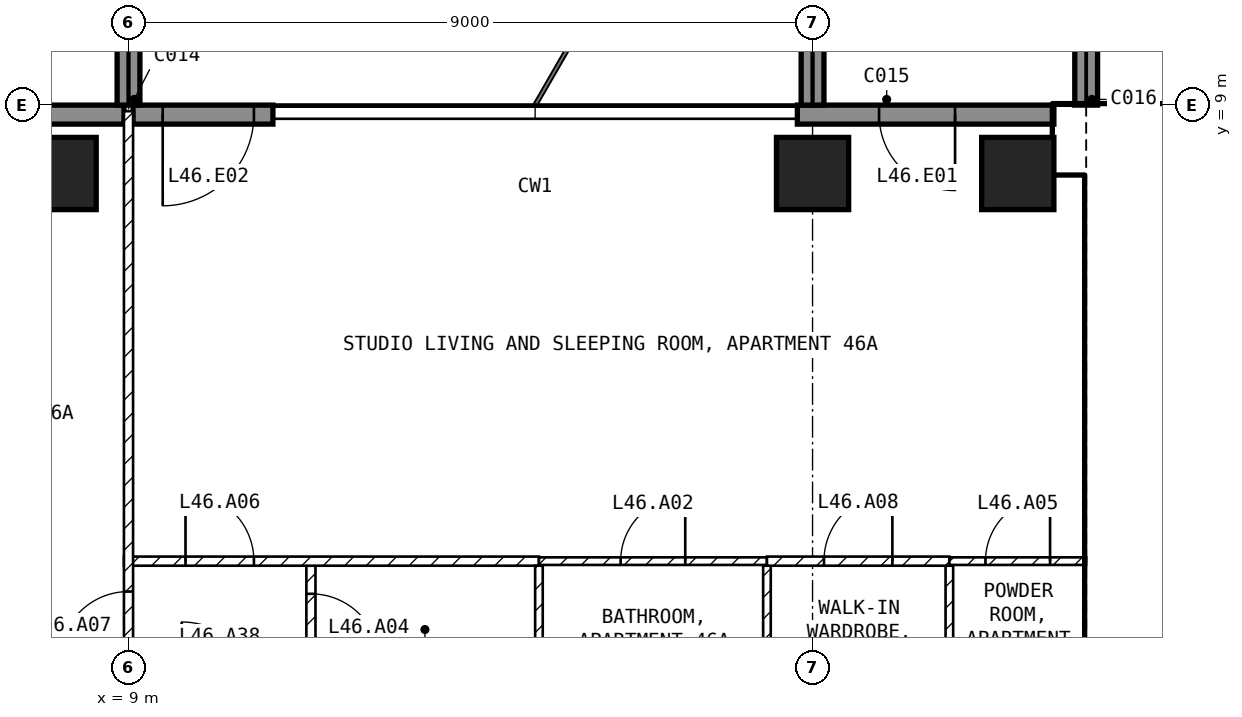
"""IFC4 building model, lengths in metres.
Left out: names, types, materials, properties, quantities, classifications, styles, units other than length and angle.
Written with IfcOpenShell. Run it as: python <this file> out.ifc"""

import sys

from ifc_helpers import new_model, si_unit, direction, frame, frame_2d, origin, origin_2d, place, context, subcontext, project, spatial, rectangle, extrude, element, fill, save


model = new_model("IFC4")
c1 = context("Model", 3, precision=1e-05, world=origin(), true_north=direction((0.0, 1.0)))
c2 = subcontext(c1, "Body", "Model", "MODEL_VIEW")
j1 = project(units=[si_unit("LENGTHUNIT", "METRE"), si_unit("PLANEANGLEUNIT", "RADIAN")], contexts=[c1])
p1 = place(None, origin())
s1 = spatial("IfcSite", under=j1, at=p1, CompositionType="ELEMENT")
p2 = place(p1, origin())
s2 = spatial("IfcBuilding", under=s1, at=p2, CompositionType="ELEMENT")
p3 = place(p2, frame((0.0, 0.0, 187.6)))
s3 = spatial("IfcBuildingStorey", under=s2, at=p3, CompositionType="ELEMENT", Elevation=187.6)
for number, where, z_axis, x_axis in (
    (1, (8.1, 8.1, -0.25), (0.0, 0.0, 1.0), (1.0, 0.0, 0.0)),
    (2, (18.0, 8.1, -0.25), (0.0, 0.0, 1.0), (1.0, 0.0, 0.0)),
    (3, (20.7, 8.1, -0.25), (0.0, 0.0, 1.0), (1.0, 0.0, 0.0)),
):
    element("IfcColumn", number, at=place(p3, frame(where, z_axis=z_axis, x_axis=x_axis)), inside=s3, PredefinedType="COLUMN", context=c2, shape_type="SweptSolid", body=[
        extrude(rectangle(XDim=0.95, YDim=0.95, at=origin_2d()), origin(), (0.0, 0.0, 1.0), 3.5),
    ])
p4 = place(p3, frame((21.175, 8.875, 0.0), z_axis=(0.0, 0.0, 1.0), x_axis=(-1.0, 0.0, 0.0)))
e4 = element("IfcWall", 4, at=p4, inside=s3, PredefinedType="SOLIDWALL", context=c2, shape_type="SweptSolid", body=[
    extrude(rectangle(XDim=3.375, YDim=0.25, at=frame_2d((1.688, 0.0))), origin(), (0.0, 0.0, 1.0), 3.25),
])
p5 = place(p4, frame((1.3, 0.0, 0.0)))
e5 = element("IfcOpeningElement", 5, at=p5, cuts=e4, PredefinedType="OPENING", context=c2, shape_type="SweptSolid", body=[
    extrude(rectangle(XDim=1.0, YDim=2.4, at=frame_2d((0.5, 1.2))), frame((0.0, 0.135, 0.0), z_axis=(0.0, -1.0, 0.0), x_axis=(1.0, 0.0, 0.0)), (0.0, 0.0, 1.0), 0.27),
])
p6 = place(p3, frame((10.9, 8.875, 0.0), z_axis=(0.0, 0.0, 1.0), x_axis=(-1.0, 0.0, 0.0)))
e6 = element("IfcWall", 6, at=p6, inside=s3, PredefinedType="SOLIDWALL", context=c2, shape_type="SweptSolid", body=[
    extrude(rectangle(XDim=1.84, YDim=0.25, at=frame_2d((0.92, 0.0))), origin(), (0.0, 0.0, 1.0), 3.25),
])
p7 = place(p6, frame((0.25, 0.0, 0.0)))
e7 = element("IfcOpeningElement", 7, at=p7, cuts=e6, PredefinedType="OPENING", context=c2, shape_type="SweptSolid", body=[
    extrude(rectangle(XDim=1.2, YDim=2.4, at=frame_2d((0.6, 1.2))), frame((0.0, 0.135, 0.0), z_axis=(0.0, -1.0, 0.0), x_axis=(1.0, 0.0, 0.0)), (0.0, 0.0, 1.0), 0.27),
])
p8 = place(p3, frame((8.94, 8.875, 0.0), z_axis=(0.0, 0.0, 1.0), x_axis=(-1.0, 0.0, 0.0)))
e8 = element("IfcWall", 8, at=p8, inside=s3, PredefinedType="SOLIDWALL", context=c2, shape_type="SweptSolid", body=[
    extrude(rectangle(XDim=3.115, YDim=0.25, at=frame_2d((1.558, 0.0))), origin(), (0.0, 0.0, 1.0), 3.25),
])
p9 = place(p8, frame((1.665, 0.0, 0.0)))
e9 = element("IfcOpeningElement", 9, at=p9, cuts=e8, PredefinedType="OPENING", context=c2, shape_type="SweptSolid", body=[
    extrude(rectangle(XDim=1.2, YDim=2.4, at=frame_2d((0.6, 1.2))), frame((0.0, 0.135, 0.0), z_axis=(0.0, -1.0, 0.0), x_axis=(1.0, 0.0, 0.0)), (0.0, 0.0, 1.0), 0.27),
])
for number, where, z_axis, x_axis in (
    (10, (9.0, 9.0, 0.0), (0.0, 0.0, 1.0), (0.0, 1.0, 0.0)),
    (11, (18.0, 9.0, 0.0), (0.0, 0.0, 1.0), (0.0, 1.0, 0.0)),
    (12, (21.6, 9.0, 0.0), (0.0, 0.0, 1.0), (0.0, 1.0, 0.0)),
):
    element("IfcWall", number, at=place(p3, frame(where, z_axis=z_axis, x_axis=x_axis)), inside=s3, PredefinedType="SOLIDWALL", context=c2, shape_type="SweptSolid", body=[
        extrude(rectangle(XDim=2.7, YDim=0.3, at=frame_2d((1.35, 0.0))), origin(), (0.0, 0.0, 1.0), 3.25),
    ])
p10 = place(p3, frame((21.175, 8.55, 0.0), z_axis=(0.0, 0.0, 1.0), x_axis=(1.0, 0.0, 0.0)))
e13 = element("IfcWall", 13, at=p10, inside=s3, PredefinedType="SHEAR", context=c2, shape_type="SweptSolid", body=[
    extrude(rectangle(XDim=8.425, YDim=0.9, at=frame_2d((4.212, 0.0))), origin(), (0.0, 0.0, 1.0), 3.25),
])
p11 = place(p3, frame((21.825, 1.2, 0.0), z_axis=(0.0, 0.0, 1.0), x_axis=(0.0, 1.0, 0.0)))
e14 = element("IfcWall", 14, at=p11, inside=s3, PredefinedType="SHEAR", context=c2, shape_type="SweptSolid", body=[
    extrude(rectangle(XDim=6.9, YDim=0.45, at=frame_2d((3.45, 0.0))), origin(), (0.0, 0.0, 1.0), 3.25),
])
p12 = place(p3, frame((22.05, 5.15, 0.0), z_axis=(0.0, 0.0, 1.0), x_axis=(1.0, 0.0, 0.0)))
e15 = element("IfcWall", 15, at=p12, inside=s3, PredefinedType="SOLIDWALL", context=c2, shape_type="SweptSolid", body=[
    extrude(rectangle(XDim=6.3, YDim=0.2, at=frame_2d((3.15, 0.0))), origin(), (0.0, 0.0, 1.0), 3.25),
])
p13 = place(p12, frame((0.2, 0.0, 0.0)))
e16 = element("IfcOpeningElement", 16, at=p13, cuts=e15, PredefinedType="OPENING", context=c2, shape_type="SweptSolid", body=[
    extrude(rectangle(XDim=1.0, YDim=2.1, at=frame_2d((0.5, 1.05))), frame((0.0, 0.11, 0.0), z_axis=(0.0, -1.0, 0.0), x_axis=(1.0, 0.0, 0.0)), (0.0, 0.0, 1.0), 0.22),
])
p14 = place(p3, frame((11.4, 2.94, 0.0), z_axis=(0.0, 0.0, 1.0), x_axis=(0.0, -1.0, 0.0)))
e17 = element("IfcWall", 17, at=p14, inside=s3, PredefinedType="PARTITIONING", context=c2, shape_type="SweptSolid", body=[
    extrude(rectangle(XDim=1.64, YDim=0.12, at=frame_2d((0.82, 0.0))), origin(), (0.0, 0.0, 1.0), 3.25),
])
p15 = place(p14, frame((0.37, 0.0, 0.0)))
e18 = element("IfcOpeningElement", 18, at=p15, cuts=e17, PredefinedType="OPENING", context=c2, shape_type="SweptSolid", body=[
    extrude(rectangle(XDim=0.9, YDim=2.1, at=frame_2d((0.45, 1.05))), frame((0.0, 0.07, 0.0), z_axis=(0.0, -1.0, 0.0), x_axis=(1.0, 0.0, 0.0)), (0.0, 0.0, 1.0), 0.14),
])
p16 = place(p3, frame((8.94, 3.0, 0.0), z_axis=(0.0, 0.0, 1.0), x_axis=(1.0, 0.0, 0.0)))
e19 = element("IfcWall", 19, at=p16, inside=s3, PredefinedType="PARTITIONING", context=c2, shape_type="SweptSolid", body=[
    extrude(rectangle(XDim=5.46, YDim=0.12, at=frame_2d((2.73, 0.0))), origin(), (0.0, 0.0, 1.0), 3.25),
])
p17 = place(p16, frame((0.81, 0.0, 0.0)))
e20 = element("IfcOpeningElement", 20, at=p17, cuts=e19, PredefinedType="OPENING", context=c2, shape_type="SweptSolid", body=[
    extrude(rectangle(XDim=0.9, YDim=2.1, at=frame_2d((0.45, 1.05))), frame((0.0, 0.07, 0.0), z_axis=(0.0, -1.0, 0.0), x_axis=(1.0, 0.0, 0.0)), (0.0, 0.0, 1.0), 0.14),
])
p18 = place(p3, frame((9.0, 1.3, 0.0), z_axis=(0.0, 0.0, 1.0), x_axis=(0.0, 1.0, 0.0)))
e21 = element("IfcWall", 21, at=p18, inside=s3, PredefinedType="PARTITIONING", context=c2, shape_type="SweptSolid", body=[
    extrude(rectangle(XDim=7.62, YDim=0.12, at=frame_2d((3.81, 0.0))), origin(), (0.0, 0.0, 1.0), 3.25),
])
p19 = place(p18, frame((0.4, 0.0, 0.0)))
e22 = element("IfcOpeningElement", 22, at=p19, cuts=e21, PredefinedType="OPENING", context=c2, shape_type="SweptSolid", body=[
    extrude(rectangle(XDim=0.9, YDim=2.1, at=frame_2d((0.45, 1.05))), frame((0.0, 0.07, 0.0), z_axis=(0.0, -1.0, 0.0), x_axis=(1.0, 0.0, 0.0)), (0.0, 0.0, 1.0), 0.14),
])
for number, where, z_axis, x_axis in (
    (23, (14.4, 2.94, 0.0), (0.0, 0.0, 1.0), (0.0, -1.0, 0.0)),
    (24, (17.4, 2.94, 0.0), (0.0, 0.0, 1.0), (0.0, -1.0, 0.0)),
):
    element("IfcWall", number, at=place(p3, frame(where, z_axis=z_axis, x_axis=x_axis)), inside=s3, PredefinedType="PARTITIONING", context=c2, shape_type="SweptSolid", body=[
        extrude(rectangle(XDim=1.64, YDim=0.1, at=frame_2d((0.82, 0.0))), origin(), (0.0, 0.0, 1.0), 3.25),
    ])
p20 = place(p3, frame((14.4, 3.0, 0.0), z_axis=(0.0, 0.0, 1.0), x_axis=(1.0, 0.0, 0.0)))
e25 = element("IfcWall", 25, at=p20, inside=s3, PredefinedType="PARTITIONING", context=c2, shape_type="SweptSolid", body=[
    extrude(rectangle(XDim=3.0, YDim=0.1, at=frame_2d((1.5, 0.0))), origin(), (0.0, 0.0, 1.0), 3.25),
])
p21 = place(p20, frame((1.075, 0.0, 0.0)))
e26 = element("IfcOpeningElement", 26, at=p21, cuts=e25, PredefinedType="OPENING", context=c2, shape_type="SweptSolid", body=[
    extrude(rectangle(XDim=0.85, YDim=2.1, at=frame_2d((0.425, 1.05))), frame((0.0, 0.06, 0.0), z_axis=(0.0, -1.0, 0.0), x_axis=(1.0, 0.0, 0.0)), (0.0, 0.0, 1.0), 0.12),
])
p22 = place(p3, frame((19.8, 2.94, 0.0), z_axis=(0.0, 0.0, 1.0), x_axis=(0.0, -1.0, 0.0)))
e27 = element("IfcWall", 27, at=p22, inside=s3, PredefinedType="PARTITIONING", context=c2, shape_type="SweptSolid", body=[
    extrude(rectangle(XDim=1.64, YDim=0.1, at=frame_2d((0.82, 0.0))), origin(), (0.0, 0.0, 1.0), 3.25),
])
p23 = place(p3, frame((17.4, 3.0, 0.0), z_axis=(0.0, 0.0, 1.0), x_axis=(1.0, 0.0, 0.0)))
e28 = element("IfcWall", 28, at=p23, inside=s3, PredefinedType="PARTITIONING", context=c2, shape_type="SweptSolid", body=[
    extrude(rectangle(XDim=2.4, YDim=0.12, at=frame_2d((1.2, 0.0))), origin(), (0.0, 0.0, 1.0), 3.25),
])
p24 = place(p23, frame((0.75, 0.0, 0.0)))
e29 = element("IfcOpeningElement", 29, at=p24, cuts=e28, PredefinedType="OPENING", context=c2, shape_type="SweptSolid", body=[
    extrude(rectangle(XDim=0.9, YDim=2.1, at=frame_2d((0.45, 1.05))), frame((0.0, 0.07, 0.0), z_axis=(0.0, -1.0, 0.0), x_axis=(1.0, 0.0, 0.0)), (0.0, 0.0, 1.0), 0.14),
])
p25 = place(p3, frame((19.8, 3.0, 0.0), z_axis=(0.0, 0.0, 1.0), x_axis=(1.0, 0.0, 0.0)))
e30 = element("IfcWall", 30, at=p25, inside=s3, PredefinedType="PARTITIONING", context=c2, shape_type="SweptSolid", body=[
    extrude(rectangle(XDim=1.8, YDim=0.1, at=frame_2d((0.9, 0.0))), origin(), (0.0, 0.0, 1.0), 3.25),
])
p26 = place(p25, frame((0.475, 0.0, 0.0)))
e31 = element("IfcOpeningElement", 31, at=p26, cuts=e30, PredefinedType="OPENING", context=c2, shape_type="SweptSolid", body=[
    extrude(rectangle(XDim=0.85, YDim=2.1, at=frame_2d((0.425, 1.05))), frame((0.0, 0.06, 0.0), z_axis=(0.0, -1.0, 0.0), x_axis=(1.0, 0.0, 0.0)), (0.0, 0.0, 1.0), 0.12),
])
p27 = place(p5, origin())
e32 = element("IfcDoor", 32, at=p27, inside=s3, OperationType="SINGLE_SWING_LEFT", PredefinedType="DOOR", context=c2, shape_type="SweptSolid", body=[
    extrude(rectangle(XDim=1.0, YDim=2.4, at=frame_2d((0.5, 1.2))), frame((0.0, 0.025, 0.0), z_axis=(0.0, -1.0, 0.0), x_axis=(1.0, 0.0, 0.0)), (0.0, 0.0, 1.0), 0.05),
])
fill(e5, e32)
p28 = place(p7, origin())
e33 = element("IfcDoor", 33, at=p28, inside=s3, OperationType="SINGLE_SWING_RIGHT", PredefinedType="DOOR", context=c2, shape_type="SweptSolid", body=[
    extrude(rectangle(XDim=1.2, YDim=2.4, at=frame_2d((0.6, 1.2))), frame((0.0, 0.025, 0.0), z_axis=(0.0, -1.0, 0.0), x_axis=(1.0, 0.0, 0.0)), (0.0, 0.0, 1.0), 0.05),
])
fill(e7, e33)
p29 = place(p13, origin())
e34 = element("IfcDoor", 34, at=p29, inside=s3, OperationType="SINGLE_SWING_LEFT", PredefinedType="DOOR", context=c2, shape_type="SweptSolid", body=[
    extrude(rectangle(XDim=1.0, YDim=2.1, at=frame_2d((0.5, 1.05))), frame((0.0, 0.025, 0.0), z_axis=(0.0, -1.0, 0.0), x_axis=(1.0, 0.0, 0.0)), (0.0, 0.0, 1.0), 0.05),
])
fill(e16, e34)
p30 = place(p21, origin())
e35 = element("IfcDoor", 35, at=p30, inside=s3, OperationType="SINGLE_SWING_RIGHT", PredefinedType="DOOR", context=c2, shape_type="SweptSolid", body=[
    extrude(rectangle(XDim=0.85, YDim=2.1, at=frame_2d((0.425, 1.05))), frame((0.0, 0.025, 0.0), z_axis=(0.0, -1.0, 0.0), x_axis=(1.0, 0.0, 0.0)), (0.0, 0.0, 1.0), 0.05),
])
fill(e26, e35)
p31 = place(p15, origin())
e36 = element("IfcDoor", 36, at=p31, inside=s3, OperationType="SINGLE_SWING_RIGHT", PredefinedType="DOOR", context=c2, shape_type="SweptSolid", body=[
    extrude(rectangle(XDim=0.9, YDim=2.1, at=frame_2d((0.45, 1.05))), frame((0.0, 0.025, 0.0), z_axis=(0.0, -1.0, 0.0), x_axis=(1.0, 0.0, 0.0)), (0.0, 0.0, 1.0), 0.05),
])
fill(e18, e36)
p32 = place(p26, origin())
e37 = element("IfcDoor", 37, at=p32, inside=s3, OperationType="SINGLE_SWING_RIGHT", PredefinedType="DOOR", context=c2, shape_type="SweptSolid", body=[
    extrude(rectangle(XDim=0.85, YDim=2.1, at=frame_2d((0.425, 1.05))), frame((0.0, 0.025, 0.0), z_axis=(0.0, -1.0, 0.0), x_axis=(1.0, 0.0, 0.0)), (0.0, 0.0, 1.0), 0.05),
])
fill(e31, e37)
p33 = place(p17, origin())
e38 = element("IfcDoor", 38, at=p33, inside=s3, OperationType="SINGLE_SWING_LEFT", PredefinedType="DOOR", context=c2, shape_type="SweptSolid", body=[
    extrude(rectangle(XDim=0.9, YDim=2.1, at=frame_2d((0.45, 1.05))), frame((0.0, 0.025, 0.0), z_axis=(0.0, -1.0, 0.0), x_axis=(1.0, 0.0, 0.0)), (0.0, 0.0, 1.0), 0.05),
])
fill(e20, e38)
p34 = place(p19, origin())
e39 = element("IfcDoor", 39, at=p34, inside=s3, OperationType="SINGLE_SWING_LEFT", PredefinedType="DOOR", context=c2, shape_type="SweptSolid", body=[
    extrude(rectangle(XDim=0.9, YDim=2.1, at=frame_2d((0.45, 1.05))), frame((0.0, 0.025, 0.0), z_axis=(0.0, -1.0, 0.0), x_axis=(1.0, 0.0, 0.0)), (0.0, 0.0, 1.0), 0.05),
])
fill(e22, e39)
p35 = place(p24, origin())
e40 = element("IfcDoor", 40, at=p35, inside=s3, OperationType="SINGLE_SWING_RIGHT", PredefinedType="DOOR", context=c2, shape_type="SweptSolid", body=[
    extrude(rectangle(XDim=0.9, YDim=2.1, at=frame_2d((0.45, 1.05))), frame((0.0, 0.025, 0.0), z_axis=(0.0, -1.0, 0.0), x_axis=(1.0, 0.0, 0.0)), (0.0, 0.0, 1.0), 0.05),
])
fill(e29, e40)
save(model, sys.argv[1])
